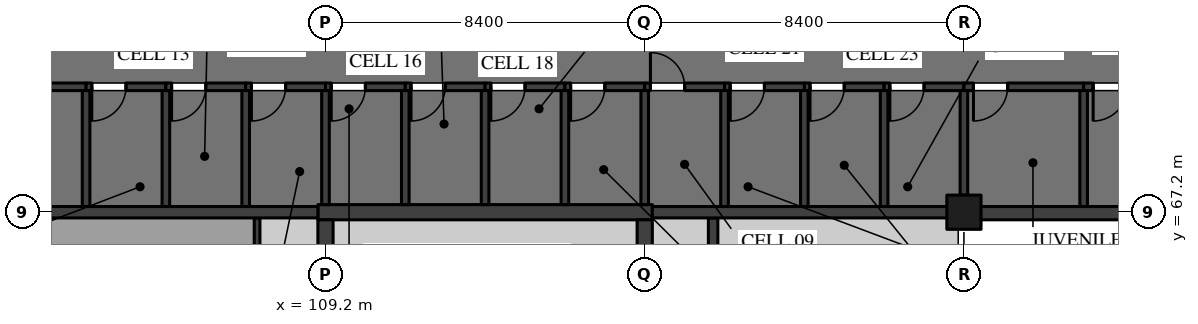
"""IFC4 building model, lengths in metres.
Left out: names, types, materials, properties, quantities, classifications, styles, units other than length and angle.
Written with IfcOpenShell. Run it as: python <this file> out.ifc"""

import sys

from ifc_helpers import new_model, si_unit, direction, frame, frame_2d, origin, origin_2d, place, context, subcontext, project, spatial, rectangle, extrude, element, fill, save


model = new_model("IFC4")
c1 = context("Model", 3, precision=1e-05, world=origin(), true_north=direction((0.0, 1.0)))
c2 = subcontext(c1, "Body", "Model", "MODEL_VIEW")
j1 = project(units=[si_unit("LENGTHUNIT", "METRE"), si_unit("PLANEANGLEUNIT", "RADIAN")], contexts=[c1])
p1 = place(None, origin())
s1 = spatial("IfcSite", under=j1, at=p1, CompositionType="ELEMENT")
p2 = place(p1, origin())
s2 = spatial("IfcBuilding", under=s1, at=p2, CompositionType="ELEMENT")
p3 = place(p2, origin())
s3 = spatial("IfcBuildingStorey", under=s2, at=p3, CompositionType="ELEMENT", Elevation=0.0)
p4 = place(p3, frame((126.0, 67.2, 0.0), z_axis=(0.0, 0.0, 1.0), x_axis=(1.0, 0.0, 0.0)))
e1 = element("IfcColumn", 1, at=p4, inside=s3, PredefinedType="COLUMN", context=c2, shape_type="SweptSolid", body=[
    extrude(rectangle(XDim=0.9, YDim=0.9, at=origin_2d()), origin(), (0.0, 0.0, 1.0), 5.05),
])
p5 = place(p3, frame((109.0, 67.2, 0.0), z_axis=(0.0, 0.0, 1.0), x_axis=(1.0, 0.0, 0.0)))
e2 = element("IfcWall", 2, at=p5, inside=s3, PredefinedType="SHEAR", context=c2, shape_type="SweptSolid", body=[
    extrude(rectangle(XDim=8.8, YDim=0.4, at=frame_2d((4.4, 0.0))), origin(), (0.0, 0.0, 1.0), 5.05),
])
p6 = place(p3, frame((109.2, 59.0, 0.0), z_axis=(0.0, 0.0, 1.0), x_axis=(0.0, 1.0, 0.0)))
e3 = element("IfcWall", 3, at=p6, inside=s3, PredefinedType="SHEAR", context=c2, shape_type="SweptSolid", body=[
    extrude(rectangle(XDim=8.0, YDim=0.4, at=frame_2d((4.0, 0.0))), origin(), (0.0, 0.0, 1.0), 5.05),
])
p7 = place(p6, frame((2.925, 0.0, 0.0)))
e4 = element("IfcOpeningElement", 4, at=p7, cuts=e3, PredefinedType="OPENING", context=c2, shape_type="SweptSolid", body=[
    extrude(rectangle(XDim=1.2, YDim=2.1, at=frame_2d((0.6, 1.05))), frame((0.0, 0.21, 0.0), z_axis=(0.0, -1.0, 0.0), x_axis=(1.0, 0.0, 0.0)), (0.0, 0.0, 1.0), 0.42),
])
p8 = place(p3, frame((117.6, 59.0, 0.0), z_axis=(0.0, 0.0, 1.0), x_axis=(0.0, 1.0, 0.0)))
e5 = element("IfcWall", 5, at=p8, inside=s3, PredefinedType="SHEAR", context=c2, shape_type="SweptSolid", body=[
    extrude(rectangle(XDim=8.0, YDim=0.4, at=frame_2d((4.0, 0.0))), origin(), (0.0, 0.0, 1.0), 5.05),
])
p9 = place(p8, frame((2.925, 0.0, 0.0)))
e6 = element("IfcOpeningElement", 6, at=p9, cuts=e5, PredefinedType="OPENING", context=c2, shape_type="SweptSolid", body=[
    extrude(rectangle(XDim=1.2, YDim=2.1, at=frame_2d((0.6, 1.05))), frame((0.0, 0.21, 0.0), z_axis=(0.0, -1.0, 0.0), x_axis=(1.0, 0.0, 0.0)), (0.0, 0.0, 1.0), 0.42),
])
p10 = place(p3, frame((119.4, 63.0, 0.0), z_axis=(0.0, 0.0, 1.0), x_axis=(0.0, 1.0, 0.0)))
e7 = element("IfcWall", 7, at=p10, inside=s3, PredefinedType="PARTITIONING", context=c2, shape_type="SweptSolid", body=[
    extrude(rectangle(XDim=4.05, YDim=0.25, at=frame_2d((2.025, 0.0))), origin(), (0.0, 0.0, 1.0), 5.05),
])
p11 = place(p10, frame((1.4, 0.0, 0.0)))
e8 = element("IfcOpeningElement", 8, at=p11, cuts=e7, PredefinedType="OPENING", context=c2, shape_type="SweptSolid", body=[
    extrude(rectangle(XDim=1.2, YDim=2.4, at=frame_2d((0.6, 1.2))), frame((0.0, 0.135, 0.0), z_axis=(0.0, -1.0, 0.0), x_axis=(1.0, 0.0, 0.0)), (0.0, 0.0, 1.0), 0.27),
])
p12 = place(p3, frame((107.4, 58.8, 0.0), z_axis=(0.0, 0.0, 1.0), x_axis=(0.0, 1.0, 0.0)))
e9 = element("IfcWall", 9, at=p12, inside=s3, PredefinedType="PARTITIONING", context=c2, shape_type="SweptSolid", body=[
    extrude(rectangle(XDim=8.25, YDim=0.15, at=frame_2d((4.125, 0.0))), origin(), (0.0, 0.0, 1.0), 5.05),
])
p13 = place(p12, frame((3.65, 0.0, 0.0)))
e10 = element("IfcOpeningElement", 10, at=p13, cuts=e9, PredefinedType="OPENING", context=c2, shape_type="SweptSolid", body=[
    extrude(rectangle(XDim=0.9, YDim=2.1, at=frame_2d((0.45, 1.05))), frame((0.0, 0.085, 0.0), z_axis=(0.0, -1.0, 0.0), x_axis=(1.0, 0.0, 0.0)), (0.0, 0.0, 1.0), 0.17),
])
p14 = place(p3, frame((100.8, 70.5, 0.0), z_axis=(0.0, 0.0, 1.0), x_axis=(1.0, 0.0, 0.0)))
e11 = element("IfcWall", 11, at=p14, inside=s3, PredefinedType="PARTITIONING", context=c2, shape_type="SweptSolid", body=[
    extrude(rectangle(XDim=2.1, YDim=0.2, at=frame_2d((1.05, 0.0))), origin(), (0.0, 0.0, 1.0), 5.05),
])
p15 = place(p14, frame((0.15, 0.0, 0.0)))
e12 = element("IfcOpeningElement", 12, at=p15, cuts=e11, PredefinedType="OPENING", context=c2, shape_type="SweptSolid", body=[
    extrude(rectangle(XDim=0.9, YDim=2.1, at=frame_2d((0.45, 1.05))), frame((0.0, 0.11, 0.0), z_axis=(0.0, -1.0, 0.0), x_axis=(1.0, 0.0, 0.0)), (0.0, 0.0, 1.0), 0.22),
])
p16 = place(p3, frame((102.9, 70.5, 0.0), z_axis=(0.0, 0.0, 1.0), x_axis=(1.0, 0.0, 0.0)))
e13 = element("IfcWall", 13, at=p16, inside=s3, PredefinedType="PARTITIONING", context=c2, shape_type="SweptSolid", body=[
    extrude(rectangle(XDim=2.1, YDim=0.2, at=frame_2d((1.05, 0.0))), origin(), (0.0, 0.0, 1.0), 5.05),
])
p17 = place(p16, frame((0.15, 0.0, 0.0)))
e14 = element("IfcOpeningElement", 14, at=p17, cuts=e13, PredefinedType="OPENING", context=c2, shape_type="SweptSolid", body=[
    extrude(rectangle(XDim=0.9, YDim=2.1, at=frame_2d((0.45, 1.05))), frame((0.0, 0.11, 0.0), z_axis=(0.0, -1.0, 0.0), x_axis=(1.0, 0.0, 0.0)), (0.0, 0.0, 1.0), 0.22),
])
p18 = place(p3, frame((121.8, 70.5, 0.0), z_axis=(0.0, 0.0, 1.0), x_axis=(1.0, 0.0, 0.0)))
e15 = element("IfcWall", 15, at=p18, inside=s3, PredefinedType="PARTITIONING", context=c2, shape_type="SweptSolid", body=[
    extrude(rectangle(XDim=2.1, YDim=0.2, at=frame_2d((1.05, 0.0))), origin(), (0.0, 0.0, 1.0), 5.05),
])
p19 = place(p18, frame((0.15, 0.0, 0.0)))
e16 = element("IfcOpeningElement", 16, at=p19, cuts=e15, PredefinedType="OPENING", context=c2, shape_type="SweptSolid", body=[
    extrude(rectangle(XDim=0.9, YDim=2.1, at=frame_2d((0.45, 1.05))), frame((0.0, 0.11, 0.0), z_axis=(0.0, -1.0, 0.0), x_axis=(1.0, 0.0, 0.0)), (0.0, 0.0, 1.0), 0.22),
])
p20 = place(p3, frame((123.9, 70.5, 0.0), z_axis=(0.0, 0.0, 1.0), x_axis=(1.0, 0.0, 0.0)))
e17 = element("IfcWall", 17, at=p20, inside=s3, PredefinedType="PARTITIONING", context=c2, shape_type="SweptSolid", body=[
    extrude(rectangle(XDim=2.1, YDim=0.2, at=frame_2d((1.05, 0.0))), origin(), (0.0, 0.0, 1.0), 5.05),
])
p21 = place(p20, frame((0.15, 0.0, 0.0)))
e18 = element("IfcOpeningElement", 18, at=p21, cuts=e17, PredefinedType="OPENING", context=c2, shape_type="SweptSolid", body=[
    extrude(rectangle(XDim=0.9, YDim=2.1, at=frame_2d((0.45, 1.05))), frame((0.0, 0.11, 0.0), z_axis=(0.0, -1.0, 0.0), x_axis=(1.0, 0.0, 0.0)), (0.0, 0.0, 1.0), 0.22),
])
p22 = place(p3, frame((105.0, 70.5, 0.0), z_axis=(0.0, 0.0, 1.0), x_axis=(1.0, 0.0, 0.0)))
e19 = element("IfcWall", 19, at=p22, inside=s3, PredefinedType="PARTITIONING", context=c2, shape_type="SweptSolid", body=[
    extrude(rectangle(XDim=2.1, YDim=0.2, at=frame_2d((1.05, 0.0))), origin(), (0.0, 0.0, 1.0), 5.05),
])
p23 = place(p22, frame((0.15, 0.0, 0.0)))
e20 = element("IfcOpeningElement", 20, at=p23, cuts=e19, PredefinedType="OPENING", context=c2, shape_type="SweptSolid", body=[
    extrude(rectangle(XDim=0.9, YDim=2.1, at=frame_2d((0.45, 1.05))), frame((0.0, 0.11, 0.0), z_axis=(0.0, -1.0, 0.0), x_axis=(1.0, 0.0, 0.0)), (0.0, 0.0, 1.0), 0.22),
])
p24 = place(p3, frame((107.1, 70.5, 0.0), z_axis=(0.0, 0.0, 1.0), x_axis=(1.0, 0.0, 0.0)))
e21 = element("IfcWall", 21, at=p24, inside=s3, PredefinedType="PARTITIONING", context=c2, shape_type="SweptSolid", body=[
    extrude(rectangle(XDim=2.1, YDim=0.2, at=frame_2d((1.05, 0.0))), origin(), (0.0, 0.0, 1.0), 5.05),
])
p25 = place(p24, frame((0.15, 0.0, 0.0)))
e22 = element("IfcOpeningElement", 22, at=p25, cuts=e21, PredefinedType="OPENING", context=c2, shape_type="SweptSolid", body=[
    extrude(rectangle(XDim=0.9, YDim=2.1, at=frame_2d((0.45, 1.05))), frame((0.0, 0.11, 0.0), z_axis=(0.0, -1.0, 0.0), x_axis=(1.0, 0.0, 0.0)), (0.0, 0.0, 1.0), 0.22),
])
p26 = place(p3, frame((109.2, 70.5, 0.0), z_axis=(0.0, 0.0, 1.0), x_axis=(1.0, 0.0, 0.0)))
e23 = element("IfcWall", 23, at=p26, inside=s3, PredefinedType="PARTITIONING", context=c2, shape_type="SweptSolid", body=[
    extrude(rectangle(XDim=2.1, YDim=0.2, at=frame_2d((1.05, 0.0))), origin(), (0.0, 0.0, 1.0), 5.05),
])
p27 = place(p26, frame((0.15, 0.0, 0.0)))
e24 = element("IfcOpeningElement", 24, at=p27, cuts=e23, PredefinedType="OPENING", context=c2, shape_type="SweptSolid", body=[
    extrude(rectangle(XDim=0.9, YDim=2.1, at=frame_2d((0.45, 1.05))), frame((0.0, 0.11, 0.0), z_axis=(0.0, -1.0, 0.0), x_axis=(1.0, 0.0, 0.0)), (0.0, 0.0, 1.0), 0.22),
])
p28 = place(p3, frame((111.3, 70.5, 0.0), z_axis=(0.0, 0.0, 1.0), x_axis=(1.0, 0.0, 0.0)))
e25 = element("IfcWall", 25, at=p28, inside=s3, PredefinedType="PARTITIONING", context=c2, shape_type="SweptSolid", body=[
    extrude(rectangle(XDim=2.1, YDim=0.2, at=frame_2d((1.05, 0.0))), origin(), (0.0, 0.0, 1.0), 5.05),
])
p29 = place(p28, frame((0.15, 0.0, 0.0)))
e26 = element("IfcOpeningElement", 26, at=p29, cuts=e25, PredefinedType="OPENING", context=c2, shape_type="SweptSolid", body=[
    extrude(rectangle(XDim=0.9, YDim=2.1, at=frame_2d((0.45, 1.05))), frame((0.0, 0.11, 0.0), z_axis=(0.0, -1.0, 0.0), x_axis=(1.0, 0.0, 0.0)), (0.0, 0.0, 1.0), 0.22),
])
p30 = place(p3, frame((113.4, 70.5, 0.0), z_axis=(0.0, 0.0, 1.0), x_axis=(1.0, 0.0, 0.0)))
e27 = element("IfcWall", 27, at=p30, inside=s3, PredefinedType="PARTITIONING", context=c2, shape_type="SweptSolid", body=[
    extrude(rectangle(XDim=2.1, YDim=0.2, at=frame_2d((1.05, 0.0))), origin(), (0.0, 0.0, 1.0), 5.05),
])
p31 = place(p30, frame((0.15, 0.0, 0.0)))
e28 = element("IfcOpeningElement", 28, at=p31, cuts=e27, PredefinedType="OPENING", context=c2, shape_type="SweptSolid", body=[
    extrude(rectangle(XDim=0.9, YDim=2.1, at=frame_2d((0.45, 1.05))), frame((0.0, 0.11, 0.0), z_axis=(0.0, -1.0, 0.0), x_axis=(1.0, 0.0, 0.0)), (0.0, 0.0, 1.0), 0.22),
])
p32 = place(p3, frame((115.5, 70.5, 0.0), z_axis=(0.0, 0.0, 1.0), x_axis=(1.0, 0.0, 0.0)))
e29 = element("IfcWall", 29, at=p32, inside=s3, PredefinedType="PARTITIONING", context=c2, shape_type="SweptSolid", body=[
    extrude(rectangle(XDim=2.1, YDim=0.2, at=frame_2d((1.05, 0.0))), origin(), (0.0, 0.0, 1.0), 5.05),
])
p33 = place(p32, frame((0.15, 0.0, 0.0)))
e30 = element("IfcOpeningElement", 30, at=p33, cuts=e29, PredefinedType="OPENING", context=c2, shape_type="SweptSolid", body=[
    extrude(rectangle(XDim=0.9, YDim=2.1, at=frame_2d((0.45, 1.05))), frame((0.0, 0.11, 0.0), z_axis=(0.0, -1.0, 0.0), x_axis=(1.0, 0.0, 0.0)), (0.0, 0.0, 1.0), 0.22),
])
p34 = place(p3, frame((117.6, 70.5, 0.0), z_axis=(0.0, 0.0, 1.0), x_axis=(1.0, 0.0, 0.0)))
e31 = element("IfcWall", 31, at=p34, inside=s3, PredefinedType="PARTITIONING", context=c2, shape_type="SweptSolid", body=[
    extrude(rectangle(XDim=2.1, YDim=0.2, at=frame_2d((1.05, 0.0))), origin(), (0.0, 0.0, 1.0), 5.05),
])
p35 = place(p34, frame((0.15, 0.0, 0.0)))
e32 = element("IfcOpeningElement", 32, at=p35, cuts=e31, PredefinedType="OPENING", context=c2, shape_type="SweptSolid", body=[
    extrude(rectangle(XDim=0.9, YDim=2.1, at=frame_2d((0.45, 1.05))), frame((0.0, 0.11, 0.0), z_axis=(0.0, -1.0, 0.0), x_axis=(1.0, 0.0, 0.0)), (0.0, 0.0, 1.0), 0.22),
])
p36 = place(p3, frame((119.7, 70.5, 0.0), z_axis=(0.0, 0.0, 1.0), x_axis=(1.0, 0.0, 0.0)))
e33 = element("IfcWall", 33, at=p36, inside=s3, PredefinedType="PARTITIONING", context=c2, shape_type="SweptSolid", body=[
    extrude(rectangle(XDim=2.1, YDim=0.2, at=frame_2d((1.05, 0.0))), origin(), (0.0, 0.0, 1.0), 5.05),
])
p37 = place(p36, frame((0.15, 0.0, 0.0)))
e34 = element("IfcOpeningElement", 34, at=p37, cuts=e33, PredefinedType="OPENING", context=c2, shape_type="SweptSolid", body=[
    extrude(rectangle(XDim=0.9, YDim=2.1, at=frame_2d((0.45, 1.05))), frame((0.0, 0.11, 0.0), z_axis=(0.0, -1.0, 0.0), x_axis=(1.0, 0.0, 0.0)), (0.0, 0.0, 1.0), 0.22),
])
p38 = place(p3, frame((126.0, 70.5, 0.0), z_axis=(0.0, 0.0, 1.0), x_axis=(1.0, 0.0, 0.0)))
e35 = element("IfcWall", 35, at=p38, inside=s3, PredefinedType="PARTITIONING", context=c2, shape_type="SweptSolid", body=[
    extrude(rectangle(XDim=3.15, YDim=0.2, at=frame_2d((1.575, 0.0))), origin(), (0.0, 0.0, 1.0), 5.05),
])
p39 = place(p38, frame((0.25, 0.0, 0.0)))
e36 = element("IfcOpeningElement", 36, at=p39, cuts=e35, PredefinedType="OPENING", context=c2, shape_type="SweptSolid", body=[
    extrude(rectangle(XDim=0.9, YDim=2.1, at=frame_2d((0.45, 1.05))), frame((0.0, 0.11, 0.0), z_axis=(0.0, -1.0, 0.0), x_axis=(1.0, 0.0, 0.0)), (0.0, 0.0, 1.0), 0.22),
])
p40 = place(p3, frame((129.15, 70.5, 0.0), z_axis=(0.0, 0.0, 1.0), x_axis=(1.0, 0.0, 0.0)))
e37 = element("IfcWall", 37, at=p40, inside=s3, PredefinedType="PARTITIONING", context=c2, shape_type="SweptSolid", body=[
    extrude(rectangle(XDim=3.15, YDim=0.2, at=frame_2d((1.575, 0.0))), origin(), (0.0, 0.0, 1.0), 5.05),
])
p41 = place(p40, frame((0.25, 0.0, 0.0)))
e38 = element("IfcOpeningElement", 38, at=p41, cuts=e37, PredefinedType="OPENING", context=c2, shape_type="SweptSolid", body=[
    extrude(rectangle(XDim=0.9, YDim=2.1, at=frame_2d((0.45, 1.05))), frame((0.0, 0.11, 0.0), z_axis=(0.0, -1.0, 0.0), x_axis=(1.0, 0.0, 0.0)), (0.0, 0.0, 1.0), 0.22),
])
for number, where, z_axis, x_axis in (
    (39, (102.9, 67.35, 0.0), (0.0, 0.0, 1.0), (0.0, 1.0, 0.0)),
    (40, (105.0, 67.35, 0.0), (0.0, 0.0, 1.0), (0.0, 1.0, 0.0)),
    (41, (123.9, 67.35, 0.0), (0.0, 0.0, 1.0), (0.0, 1.0, 0.0)),
    (42, (121.8, 67.35, 0.0), (0.0, 0.0, 1.0), (0.0, 1.0, 0.0)),
):
    element("IfcWall", number, at=place(p3, frame(where, z_axis=z_axis, x_axis=x_axis)), inside=s3, PredefinedType="PARTITIONING", context=c2, shape_type="SweptSolid", body=[
        extrude(rectangle(XDim=3.05, YDim=0.2, at=frame_2d((1.525, 0.0))), origin(), (0.0, 0.0, 1.0), 5.05),
    ])
p42 = place(p3, frame((126.0, 67.65, 0.0), z_axis=(0.0, 0.0, 1.0), x_axis=(0.0, 1.0, 0.0)))
e43 = element("IfcWall", 43, at=p42, inside=s3, PredefinedType="PARTITIONING", context=c2, shape_type="SweptSolid", body=[
    extrude(rectangle(XDim=2.75, YDim=0.2, at=frame_2d((1.375, 0.0))), origin(), (0.0, 0.0, 1.0), 5.05),
])
p43 = place(p3, frame((107.1, 67.35, 0.0), z_axis=(0.0, 0.0, 1.0), x_axis=(0.0, 1.0, 0.0)))
e44 = element("IfcWall", 44, at=p43, inside=s3, PredefinedType="PARTITIONING", context=c2, shape_type="SweptSolid", body=[
    extrude(rectangle(XDim=3.05, YDim=0.2, at=frame_2d((1.525, 0.0))), origin(), (0.0, 0.0, 1.0), 5.05),
])
for number, where, z_axis, x_axis in (
    (45, (109.2, 67.4, 0.0), (0.0, 0.0, 1.0), (0.0, 1.0, 0.0)),
    (46, (111.3, 67.4, 0.0), (0.0, 0.0, 1.0), (0.0, 1.0, 0.0)),
    (47, (113.4, 67.4, 0.0), (0.0, 0.0, 1.0), (0.0, 1.0, 0.0)),
    (48, (115.5, 67.4, 0.0), (0.0, 0.0, 1.0), (0.0, 1.0, 0.0)),
    (49, (117.6, 67.4, 0.0), (0.0, 0.0, 1.0), (0.0, 1.0, 0.0)),
):
    element("IfcWall", number, at=place(p3, frame(where, z_axis=z_axis, x_axis=x_axis)), inside=s3, PredefinedType="PARTITIONING", context=c2, shape_type="SweptSolid", body=[
        extrude(rectangle(XDim=3.0, YDim=0.2, at=frame_2d((1.5, 0.0))), origin(), (0.0, 0.0, 1.0), 5.05),
    ])
for number, where, z_axis, x_axis in (
    (50, (119.7, 67.35, 0.0), (0.0, 0.0, 1.0), (0.0, 1.0, 0.0)),
    (51, (129.15, 67.35, 0.0), (0.0, 0.0, 1.0), (0.0, 1.0, 0.0)),
):
    element("IfcWall", number, at=place(p3, frame(where, z_axis=z_axis, x_axis=x_axis)), inside=s3, PredefinedType="PARTITIONING", context=c2, shape_type="SweptSolid", body=[
        extrude(rectangle(XDim=3.05, YDim=0.2, at=frame_2d((1.525, 0.0))), origin(), (0.0, 0.0, 1.0), 5.05),
    ])
p44 = place(p3, frame((126.43, 67.175, 0.0), z_axis=(0.0, 0.0, 1.0), x_axis=(1.0, 0.0, 0.0)))
e52 = element("IfcWall", 52, at=p44, inside=s3, PredefinedType="SOLIDWALL", context=c2, shape_type="SweptSolid", body=[
    extrude(rectangle(XDim=7.59, YDim=0.35, at=frame_2d((3.795, 0.0))), origin(), (0.0, 0.0, 1.0), 5.05),
])
for number, where, z_axis, x_axis in (
    (53, (125.57, 67.2, 0.0), (0.0, 0.0, 1.0), (-1.0, 0.0, 0.0)),
    (54, (109.0, 67.2, 0.0), (0.0, 0.0, 1.0), (-1.0, 0.0, 0.0)),
):
    element("IfcWall", number, at=place(p3, frame(where, z_axis=z_axis, x_axis=x_axis)), inside=s3, PredefinedType="SOLIDWALL", context=c2, shape_type="SweptSolid", body=[
        extrude(rectangle(XDim=7.77, YDim=0.3, at=frame_2d((3.885, 0.0))), origin(), (0.0, 0.0, 1.0), 5.05),
    ])
p45 = place(p17, frame((0.9, 0.0, 0.0), z_axis=(0.0, 0.0, 1.0), x_axis=(-1.0, 0.0, 0.0)))
e55 = element("IfcDoor", 55, at=p45, inside=s3, OperationType="SINGLE_SWING_LEFT", PredefinedType="DOOR", context=c2, shape_type="SweptSolid", body=[
    extrude(rectangle(XDim=0.9, YDim=2.1, at=frame_2d((0.45, 1.05))), frame((0.0, 0.04, 0.0), z_axis=(0.0, -1.0, 0.0), x_axis=(1.0, 0.0, 0.0)), (0.0, 0.0, 1.0), 0.08),
])
fill(e14, e55)
p46 = place(p19, frame((0.9, 0.0, 0.0), z_axis=(0.0, 0.0, 1.0), x_axis=(-1.0, 0.0, 0.0)))
e56 = element("IfcDoor", 56, at=p46, inside=s3, OperationType="SINGLE_SWING_LEFT", PredefinedType="DOOR", context=c2, shape_type="SweptSolid", body=[
    extrude(rectangle(XDim=0.9, YDim=2.1, at=frame_2d((0.45, 1.05))), frame((0.0, 0.04, 0.0), z_axis=(0.0, -1.0, 0.0), x_axis=(1.0, 0.0, 0.0)), (0.0, 0.0, 1.0), 0.08),
])
fill(e16, e56)
p47 = place(p21, frame((0.9, 0.0, 0.0), z_axis=(0.0, 0.0, 1.0), x_axis=(-1.0, 0.0, 0.0)))
e57 = element("IfcDoor", 57, at=p47, inside=s3, OperationType="SINGLE_SWING_LEFT", PredefinedType="DOOR", context=c2, shape_type="SweptSolid", body=[
    extrude(rectangle(XDim=0.9, YDim=2.1, at=frame_2d((0.45, 1.05))), frame((0.0, 0.04, 0.0), z_axis=(0.0, -1.0, 0.0), x_axis=(1.0, 0.0, 0.0)), (0.0, 0.0, 1.0), 0.08),
])
fill(e18, e57)
p48 = place(p23, frame((0.9, 0.0, 0.0), z_axis=(0.0, 0.0, 1.0), x_axis=(-1.0, 0.0, 0.0)))
e58 = element("IfcDoor", 58, at=p48, inside=s3, OperationType="SINGLE_SWING_LEFT", PredefinedType="DOOR", context=c2, shape_type="SweptSolid", body=[
    extrude(rectangle(XDim=0.9, YDim=2.1, at=frame_2d((0.45, 1.05))), frame((0.0, 0.04, 0.0), z_axis=(0.0, -1.0, 0.0), x_axis=(1.0, 0.0, 0.0)), (0.0, 0.0, 1.0), 0.08),
])
fill(e20, e58)
p49 = place(p25, frame((0.9, 0.0, 0.0), z_axis=(0.0, 0.0, 1.0), x_axis=(-1.0, 0.0, 0.0)))
e59 = element("IfcDoor", 59, at=p49, inside=s3, OperationType="SINGLE_SWING_LEFT", PredefinedType="DOOR", context=c2, shape_type="SweptSolid", body=[
    extrude(rectangle(XDim=0.9, YDim=2.1, at=frame_2d((0.45, 1.05))), frame((0.0, 0.04, 0.0), z_axis=(0.0, -1.0, 0.0), x_axis=(1.0, 0.0, 0.0)), (0.0, 0.0, 1.0), 0.08),
])
fill(e22, e59)
p50 = place(p27, frame((0.9, 0.0, 0.0), z_axis=(0.0, 0.0, 1.0), x_axis=(-1.0, 0.0, 0.0)))
e60 = element("IfcDoor", 60, at=p50, inside=s3, OperationType="SINGLE_SWING_LEFT", PredefinedType="DOOR", context=c2, shape_type="SweptSolid", body=[
    extrude(rectangle(XDim=0.9, YDim=2.1, at=frame_2d((0.45, 1.05))), frame((0.0, 0.04, 0.0), z_axis=(0.0, -1.0, 0.0), x_axis=(1.0, 0.0, 0.0)), (0.0, 0.0, 1.0), 0.08),
])
fill(e24, e60)
p51 = place(p29, frame((0.9, 0.0, 0.0), z_axis=(0.0, 0.0, 1.0), x_axis=(-1.0, 0.0, 0.0)))
e61 = element("IfcDoor", 61, at=p51, inside=s3, OperationType="SINGLE_SWING_LEFT", PredefinedType="DOOR", context=c2, shape_type="SweptSolid", body=[
    extrude(rectangle(XDim=0.9, YDim=2.1, at=frame_2d((0.45, 1.05))), frame((0.0, 0.04, 0.0), z_axis=(0.0, -1.0, 0.0), x_axis=(1.0, 0.0, 0.0)), (0.0, 0.0, 1.0), 0.08),
])
fill(e26, e61)
p52 = place(p31, frame((0.9, 0.0, 0.0), z_axis=(0.0, 0.0, 1.0), x_axis=(-1.0, 0.0, 0.0)))
e62 = element("IfcDoor", 62, at=p52, inside=s3, OperationType="SINGLE_SWING_LEFT", PredefinedType="DOOR", context=c2, shape_type="SweptSolid", body=[
    extrude(rectangle(XDim=0.9, YDim=2.1, at=frame_2d((0.45, 1.05))), frame((0.0, 0.04, 0.0), z_axis=(0.0, -1.0, 0.0), x_axis=(1.0, 0.0, 0.0)), (0.0, 0.0, 1.0), 0.08),
])
fill(e28, e62)
p53 = place(p33, frame((0.9, 0.0, 0.0), z_axis=(0.0, 0.0, 1.0), x_axis=(-1.0, 0.0, 0.0)))
e63 = element("IfcDoor", 63, at=p53, inside=s3, OperationType="SINGLE_SWING_LEFT", PredefinedType="DOOR", context=c2, shape_type="SweptSolid", body=[
    extrude(rectangle(XDim=0.9, YDim=2.1, at=frame_2d((0.45, 1.05))), frame((0.0, 0.04, 0.0), z_axis=(0.0, -1.0, 0.0), x_axis=(1.0, 0.0, 0.0)), (0.0, 0.0, 1.0), 0.08),
])
fill(e30, e63)
p54 = place(p35, origin())
e64 = element("IfcDoor", 64, at=p54, inside=s3, OperationType="SINGLE_SWING_RIGHT", PredefinedType="DOOR", context=c2, shape_type="SweptSolid", body=[
    extrude(rectangle(XDim=0.9, YDim=2.1, at=frame_2d((0.45, 1.05))), frame((0.0, 0.04, 0.0), z_axis=(0.0, -1.0, 0.0), x_axis=(1.0, 0.0, 0.0)), (0.0, 0.0, 1.0), 0.08),
])
fill(e32, e64)
p55 = place(p37, frame((0.9, 0.0, 0.0), z_axis=(0.0, 0.0, 1.0), x_axis=(-1.0, 0.0, 0.0)))
e65 = element("IfcDoor", 65, at=p55, inside=s3, OperationType="SINGLE_SWING_LEFT", PredefinedType="DOOR", context=c2, shape_type="SweptSolid", body=[
    extrude(rectangle(XDim=0.9, YDim=2.1, at=frame_2d((0.45, 1.05))), frame((0.0, 0.04, 0.0), z_axis=(0.0, -1.0, 0.0), x_axis=(1.0, 0.0, 0.0)), (0.0, 0.0, 1.0), 0.08),
])
fill(e34, e65)
p56 = place(p39, frame((0.9, 0.0, 0.0), z_axis=(0.0, 0.0, 1.0), x_axis=(-1.0, 0.0, 0.0)))
e66 = element("IfcDoor", 66, at=p56, inside=s3, OperationType="SINGLE_SWING_LEFT", PredefinedType="DOOR", context=c2, shape_type="SweptSolid", body=[
    extrude(rectangle(XDim=0.9, YDim=2.1, at=frame_2d((0.45, 1.05))), frame((0.0, 0.04, 0.0), z_axis=(0.0, -1.0, 0.0), x_axis=(1.0, 0.0, 0.0)), (0.0, 0.0, 1.0), 0.08),
])
fill(e36, e66)
p57 = place(p41, frame((0.9, 0.0, 0.0), z_axis=(0.0, 0.0, 1.0), x_axis=(-1.0, 0.0, 0.0)))
e67 = element("IfcDoor", 67, at=p57, inside=s3, OperationType="SINGLE_SWING_LEFT", PredefinedType="DOOR", context=c2, shape_type="SweptSolid", body=[
    extrude(rectangle(XDim=0.9, YDim=2.1, at=frame_2d((0.45, 1.05))), frame((0.0, 0.04, 0.0), z_axis=(0.0, -1.0, 0.0), x_axis=(1.0, 0.0, 0.0)), (0.0, 0.0, 1.0), 0.08),
])
fill(e38, e67)
save(model, sys.argv[1])
